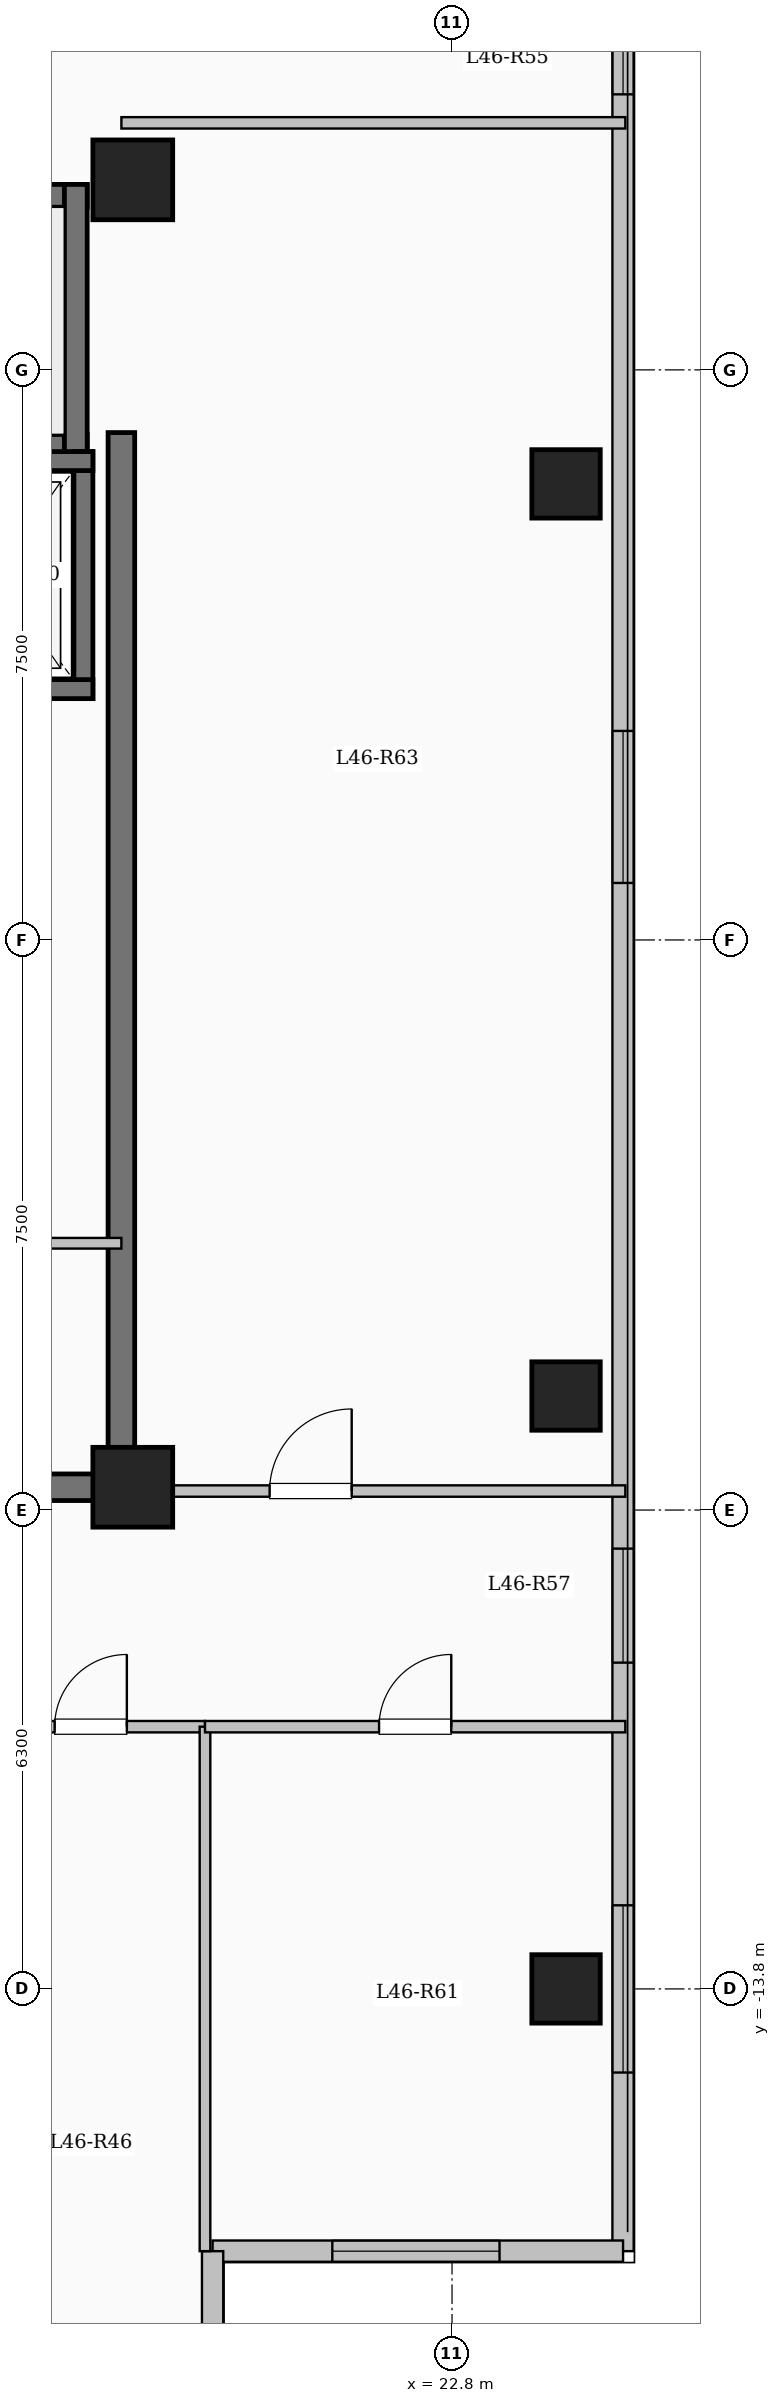
"""IFC4 building model, lengths in metres.
Left out: names, types, materials, properties, quantities, classifications, styles, units other than length and angle.
Written with IfcOpenShell. Run it as: python <this file> out.ifc"""

import sys

from ifc_helpers import new_model, si_unit, direction, frame, frame_2d, origin, origin_2d, place, context, subcontext, project, spatial, rectangle, extrude, element, fill, save


model = new_model("IFC4")
c1 = context("Model", 3, precision=1e-05, world=origin(), true_north=direction((0.0, 1.0)))
c2 = subcontext(c1, "Body", "Model", "MODEL_VIEW")
j1 = project(units=[si_unit("LENGTHUNIT", "METRE"), si_unit("PLANEANGLEUNIT", "RADIAN")], contexts=[c1])
p1 = place(None, origin())
s1 = spatial("IfcSite", under=j1, at=p1, CompositionType="ELEMENT")
p2 = place(p1, origin())
s2 = spatial("IfcBuilding", under=s1, at=p2, CompositionType="ELEMENT")
p3 = place(p2, frame((0.0, 0.0, 169.45)))
s3 = spatial("IfcBuildingStorey", under=s2, at=p3, CompositionType="ELEMENT", Elevation=169.45)
for number, where, z_axis, x_axis in (
    (1, (18.6, -7.2, 0.0), (0.0, 0.0, 1.0), (1.0, 0.0, 0.0)),
    (2, (18.6, 10.0, 0.0), (0.0, 0.0, 1.0), (1.0, 0.0, 0.0)),
):
    element("IfcColumn", number, at=place(p3, frame(where, z_axis=z_axis, x_axis=x_axis)), inside=s3, PredefinedType="COLUMN", context=c2, shape_type="SweptSolid", body=[
        extrude(rectangle(XDim=1.05, YDim=1.05, at=origin_2d()), origin(), (0.0, 0.0, 1.0), 3.35),
    ])
for number, where, z_axis, x_axis in (
    (3, (24.3, -13.8, 0.0), (0.0, 0.0, 1.0), (1.0, 0.0, 0.0)),
    (4, (24.3, -6.0, 0.0), (0.0, 0.0, 1.0), (1.0, 0.0, 0.0)),
    (5, (24.3, 6.0, 0.0), (0.0, 0.0, 1.0), (1.0, 0.0, 0.0)),
):
    element("IfcColumn", number, at=place(p3, frame(where, z_axis=z_axis, x_axis=x_axis)), inside=s3, PredefinedType="COLUMN", context=c2, shape_type="SweptSolid", body=[
        extrude(rectangle(XDim=0.9, YDim=0.9, at=origin_2d()), origin(), (0.0, 0.0, 1.0), 3.35),
    ])
p4 = place(p3, frame((25.05, 17.25, 0.0), z_axis=(0.0, 0.0, 1.0), x_axis=(0.0, -1.0, 0.0)))
e6 = element("IfcWall", 6, at=p4, inside=s3, PredefinedType="SOLIDWALL", context=c2, shape_type="SweptSolid", body=[
    extrude(rectangle(XDim=34.5, YDim=0.28, at=frame_2d((17.25, 0.0))), origin(), (0.0, 0.0, 1.0), 3.05),
])
p5 = place(p4, frame((1.375, 0.0, 0.9)))
e7 = element("IfcOpeningElement", 7, at=p5, cuts=e6, PredefinedType="OPENING", context=c2, shape_type="SweptSolid", body=[
    extrude(rectangle(XDim=2.0, YDim=1.7, at=frame_2d((1.0, 0.85))), frame((0.0, 0.15, 0.0), z_axis=(0.0, -1.0, 0.0), x_axis=(1.0, 0.0, 0.0)), (0.0, 0.0, 1.0), 0.3),
])
p6 = place(p4, frame((5.125, 0.0, 0.95)))
e8 = element("IfcOpeningElement", 8, at=p6, cuts=e6, PredefinedType="OPENING", context=c2, shape_type="SweptSolid", body=[
    extrude(rectangle(XDim=1.0, YDim=1.5, at=frame_2d((0.5, 0.75))), frame((0.0, 0.15, 0.0), z_axis=(0.0, -1.0, 0.0), x_axis=(1.0, 0.0, 0.0)), (0.0, 0.0, 1.0), 0.3),
])
p7 = place(p4, frame((14.5, 0.0, 0.9)))
e9 = element("IfcOpeningElement", 9, at=p7, cuts=e6, PredefinedType="OPENING", context=c2, shape_type="SweptSolid", body=[
    extrude(rectangle(XDim=2.0, YDim=1.7, at=frame_2d((1.0, 0.85))), frame((0.0, 0.15, 0.0), z_axis=(0.0, -1.0, 0.0), x_axis=(1.0, 0.0, 0.0)), (0.0, 0.0, 1.0), 0.3),
])
p8 = place(p4, frame((25.258, 0.0, 0.9)))
e10 = element("IfcOpeningElement", 10, at=p8, cuts=e6, PredefinedType="OPENING", context=c2, shape_type="SweptSolid", body=[
    extrude(rectangle(XDim=1.5, YDim=1.65, at=frame_2d((0.75, 0.825))), frame((0.0, 0.15, 0.0), z_axis=(0.0, -1.0, 0.0), x_axis=(1.0, 0.0, 0.0)), (0.0, 0.0, 1.0), 0.3),
])
p9 = place(p4, frame((29.95, 0.0, 0.9)))
e11 = element("IfcOpeningElement", 11, at=p9, cuts=e6, PredefinedType="OPENING", context=c2, shape_type="SweptSolid", body=[
    extrude(rectangle(XDim=2.2, YDim=1.75, at=frame_2d((1.1, 0.875))), frame((0.0, 0.15, 0.0), z_axis=(0.0, -1.0, 0.0), x_axis=(1.0, 0.0, 0.0)), (0.0, 0.0, 1.0), 0.3),
])
p10 = place(p3, frame((25.05, -17.25, 0.0), z_axis=(0.0, 0.0, 1.0), x_axis=(-1.0, 0.0, 0.0)))
e12 = element("IfcWall", 12, at=p10, inside=s3, PredefinedType="SOLIDWALL", context=c2, shape_type="SweptSolid", body=[
    extrude(rectangle(XDim=5.4, YDim=0.28, at=frame_2d((2.7, 0.0))), origin(), (0.0, 0.0, 1.0), 3.05),
])
p11 = place(p10, frame((1.625, 0.0, 0.9)))
e13 = element("IfcOpeningElement", 13, at=p11, cuts=e12, PredefinedType="OPENING", context=c2, shape_type="SweptSolid", body=[
    extrude(rectangle(XDim=2.2, YDim=1.75, at=frame_2d((1.1, 0.875))), frame((0.0, 0.15, 0.0), z_axis=(0.0, -1.0, 0.0), x_axis=(1.0, 0.0, 0.0)), (0.0, 0.0, 1.0), 0.3),
])
p12 = place(p3, frame((19.65, -17.25, 0.0), z_axis=(0.0, 0.0, 1.0), x_axis=(0.0, -1.0, 0.0)))
e14 = element("IfcWall", 14, at=p12, inside=s3, PredefinedType="SOLIDWALL", context=c2, shape_type="SweptSolid", body=[
    extrude(rectangle(XDim=3.9, YDim=0.28, at=frame_2d((1.95, 0.0))), origin(), (0.0, 0.0, 1.0), 3.05),
])
p13 = place(p12, frame((1.35, 0.0, 0.95)))
e15 = element("IfcOpeningElement", 15, at=p13, cuts=e14, PredefinedType="OPENING", context=c2, shape_type="SweptSolid", body=[
    extrude(rectangle(XDim=1.2, YDim=1.5, at=frame_2d((0.6, 0.75))), frame((0.0, 0.15, 0.0), z_axis=(0.0, -1.0, 0.0), x_axis=(1.0, 0.0, 0.0)), (0.0, 0.0, 1.0), 0.3),
])
p14 = place(p3, frame((10.0, 9.79, 0.0), z_axis=(0.0, 0.0, 1.0), x_axis=(1.0, 0.0, 0.0)))
e16 = element("IfcWall", 16, at=p14, inside=s3, PredefinedType="SHEAR", context=c2, shape_type="SweptSolid", body=[
    extrude(rectangle(XDim=8.0, YDim=0.3, at=frame_2d((4.0, 0.0))), origin(), (0.0, 0.0, 1.0), 3.35),
])
p15 = place(p3, frame((10.0, 6.5, 0.0), z_axis=(0.0, 0.0, 1.0), x_axis=(1.0, 0.0, 0.0)))
e17 = element("IfcWall", 17, at=p15, inside=s3, PredefinedType="SHEAR", context=c2, shape_type="SweptSolid", body=[
    extrude(rectangle(XDim=8.0, YDim=0.3, at=frame_2d((4.0, 0.0))), origin(), (0.0, 0.0, 1.0), 3.35),
])
p16 = place(p15, frame((0.55, 0.0, 0.0)))
e18 = element("IfcOpeningElement", 18, at=p16, cuts=e17, PredefinedType="OPENING", context=c2, shape_type="SweptSolid", body=[
    extrude(rectangle(XDim=1.0, YDim=2.15, at=frame_2d((0.5, 1.075))), frame((0.0, 0.16, 0.0), z_axis=(0.0, -1.0, 0.0), x_axis=(1.0, 0.0, 0.0)), (0.0, 0.0, 1.0), 0.32),
])
p17 = place(p3, frame((17.85, 6.35, 0.0), z_axis=(0.0, 0.0, 1.0), x_axis=(0.0, 1.0, 0.0)))
e19 = element("IfcWall", 19, at=p17, inside=s3, PredefinedType="SHEAR", context=c2, shape_type="SweptSolid", body=[
    extrude(rectangle(XDim=3.59, YDim=0.3, at=frame_2d((1.795, 0.0))), origin(), (0.0, 0.0, 1.0), 3.35),
])
p18 = place(p3, frame((17.95, 3.175, 0.0), z_axis=(0.0, 0.0, 1.0), x_axis=(0.0, 1.0, 0.0)))
e20 = element("IfcWall", 20, at=p18, inside=s3, PredefinedType="SHEAR", context=c2, shape_type="SweptSolid", body=[
    extrude(rectangle(XDim=3.25, YDim=0.25, at=frame_2d((1.625, 0.0))), origin(), (0.0, 0.0, 1.0), 3.35),
])
for number, where, z_axis, x_axis in (
    (21, (15.525, 3.3, 0.0), (0.0, 0.0, 1.0), (1.0, 0.0, 0.0)),
    (22, (15.525, 6.3, 0.0), (0.0, 0.0, 1.0), (1.0, 0.0, 0.0)),
):
    element("IfcWall", number, at=place(p3, frame(where, z_axis=z_axis, x_axis=x_axis)), inside=s3, PredefinedType="SHEAR", context=c2, shape_type="SweptSolid", body=[
        extrude(rectangle(XDim=2.55, YDim=0.25, at=frame_2d((1.275, 0.0))), origin(), (0.0, 0.0, 1.0), 3.35),
    ])
p19 = place(p3, frame((18.45, -7.375, 0.0), z_axis=(0.0, 0.0, 1.0), x_axis=(0.0, 1.0, 0.0)))
e23 = element("IfcWall", 23, at=p19, inside=s3, PredefinedType="SHEAR", context=c2, shape_type="SweptSolid", body=[
    extrude(rectangle(XDim=14.05, YDim=0.35, at=frame_2d((7.025, 0.0))), origin(), (0.0, 0.0, 1.0), 3.35),
])
p20 = place(p3, frame((10.075, -7.2, 0.0), z_axis=(0.0, 0.0, 1.0), x_axis=(1.0, 0.0, 0.0)))
e24 = element("IfcWall", 24, at=p20, inside=s3, PredefinedType="SHEAR", context=c2, shape_type="SweptSolid", body=[
    extrude(rectangle(XDim=8.55, YDim=0.35, at=frame_2d((4.275, 0.0))), origin(), (0.0, 0.0, 1.0), 3.35),
])
p21 = place(p3, frame((15.4, -3.99, 0.0), z_axis=(0.0, 0.0, 1.0), x_axis=(1.0, 0.0, 0.0)))
e25 = element("IfcWall", 25, at=p21, inside=s3, PredefinedType="PARTITIONING", context=c2, shape_type="SweptSolid", body=[
    extrude(rectangle(XDim=3.05, YDim=0.14, at=frame_2d((1.525, 0.0))), origin(), (0.0, 0.0, 1.0), 3.05),
])
p22 = place(p21, frame((1.05, 0.0, 0.0)))
e26 = element("IfcOpeningElement", 26, at=p22, cuts=e25, PredefinedType="OPENING", context=c2, shape_type="SweptSolid", body=[
    extrude(rectangle(XDim=0.9, YDim=2.08, at=frame_2d((0.45, 1.04))), frame((0.0, 0.08, 0.0), z_axis=(0.0, -1.0, 0.0), x_axis=(1.0, 0.0, 0.0)), (0.0, 0.0, 1.0), 0.16),
])
p23 = place(p3, frame((8.55, -10.35, 0.0), z_axis=(0.0, 0.0, 1.0), x_axis=(1.0, 0.0, 0.0)))
e27 = element("IfcWall", 27, at=p23, inside=s3, PredefinedType="PARTITIONING", context=c2, shape_type="SweptSolid", body=[
    extrude(rectangle(XDim=11.0, YDim=0.15, at=frame_2d((5.5, 0.0))), origin(), (0.0, 0.0, 1.0), 3.05),
])
p24 = place(p23, frame((1.516, 0.0, 0.0)))
e28 = element("IfcOpeningElement", 28, at=p24, cuts=e27, PredefinedType="OPENING", context=c2, shape_type="SweptSolid", body=[
    extrude(rectangle(XDim=0.95, YDim=2.15, at=frame_2d((0.475, 1.075))), frame((0.0, 0.085, 0.0), z_axis=(0.0, -1.0, 0.0), x_axis=(1.0, 0.0, 0.0)), (0.0, 0.0, 1.0), 0.17),
])
p25 = place(p23, frame((5.488, 0.0, 0.0)))
e29 = element("IfcOpeningElement", 29, at=p25, cuts=e27, PredefinedType="OPENING", context=c2, shape_type="SweptSolid", body=[
    extrude(rectangle(XDim=0.95, YDim=2.15, at=frame_2d((0.475, 1.075))), frame((0.0, 0.085, 0.0), z_axis=(0.0, -1.0, 0.0), x_axis=(1.0, 0.0, 0.0)), (0.0, 0.0, 1.0), 0.17),
])
p26 = place(p23, frame((9.022, 0.0, 0.0)))
e30 = element("IfcOpeningElement", 30, at=p26, cuts=e27, PredefinedType="OPENING", context=c2, shape_type="SweptSolid", body=[
    extrude(rectangle(XDim=0.95, YDim=2.15, at=frame_2d((0.475, 1.075))), frame((0.0, 0.085, 0.0), z_axis=(0.0, -1.0, 0.0), x_axis=(1.0, 0.0, 0.0)), (0.0, 0.0, 1.0), 0.17),
])
p27 = place(p3, frame((18.45, -7.25, 0.0), z_axis=(0.0, 0.0, 1.0), x_axis=(1.0, 0.0, 0.0)))
e31 = element("IfcWall", 31, at=p27, inside=s3, PredefinedType="PARTITIONING", context=c2, shape_type="SweptSolid", body=[
    extrude(rectangle(XDim=6.63, YDim=0.15, at=frame_2d((3.315, 0.0))), origin(), (0.0, 0.0, 1.0), 3.05),
])
p28 = place(p27, frame((1.95, 0.0, 0.0)))
e32 = element("IfcOpeningElement", 32, at=p28, cuts=e31, PredefinedType="OPENING", context=c2, shape_type="SweptSolid", body=[
    extrude(rectangle(XDim=1.08, YDim=2.15, at=frame_2d((0.54, 1.075))), frame((0.0, 0.085, 0.0), z_axis=(0.0, -1.0, 0.0), x_axis=(1.0, 0.0, 0.0)), (0.0, 0.0, 1.0), 0.17),
])
p29 = place(p3, frame((18.45, 10.75, 0.0), z_axis=(0.0, 0.0, 1.0), x_axis=(1.0, 0.0, 0.0)))
e33 = element("IfcWall", 33, at=p29, inside=s3, PredefinedType="PARTITIONING", context=c2, shape_type="SweptSolid", body=[
    extrude(rectangle(XDim=6.63, YDim=0.15, at=frame_2d((3.315, 0.0))), origin(), (0.0, 0.0, 1.0), 3.05),
])
p30 = place(p3, frame((19.55, -17.25, 0.0), z_axis=(0.0, 0.0, 1.0), x_axis=(0.0, 1.0, 0.0)))
e34 = element("IfcWall", 34, at=p30, inside=s3, PredefinedType="PARTITIONING", context=c2, shape_type="SweptSolid", body=[
    extrude(rectangle(XDim=6.9, YDim=0.14, at=frame_2d((3.45, 0.0))), origin(), (0.0, 0.0, 1.0), 3.05),
])
p31 = place(p3, frame((19.55, -10.35, 0.0), z_axis=(0.0, 0.0, 1.0), x_axis=(1.0, 0.0, 0.0)))
e35 = element("IfcWall", 35, at=p31, inside=s3, PredefinedType="PARTITIONING", context=c2, shape_type="SweptSolid", body=[
    extrude(rectangle(XDim=5.53, YDim=0.15, at=frame_2d((2.765, 0.0))), origin(), (0.0, 0.0, 1.0), 3.05),
])
p32 = place(p31, frame((2.29, 0.0, 0.0)))
e36 = element("IfcOpeningElement", 36, at=p32, cuts=e35, PredefinedType="OPENING", context=c2, shape_type="SweptSolid", body=[
    extrude(rectangle(XDim=0.95, YDim=2.15, at=frame_2d((0.475, 1.075))), frame((0.0, 0.085, 0.0), z_axis=(0.0, -1.0, 0.0), x_axis=(1.0, 0.0, 0.0)), (0.0, 0.0, 1.0), 0.17),
])
p33 = place(p6, origin())
e37 = element("IfcWindow", 37, at=p33, inside=s3, PartitioningType="SINGLE_PANEL", PredefinedType="WINDOW", context=c2, shape_type="SweptSolid", body=[
    extrude(rectangle(XDim=1.0, YDim=1.5, at=frame_2d((0.5, 0.75))), frame((0.0, 0.03, 0.0), z_axis=(0.0, -1.0, 0.0), x_axis=(1.0, 0.0, 0.0)), (0.0, 0.0, 1.0), 0.06),
])
fill(e8, e37)
p34 = place(p7, origin())
e38 = element("IfcWindow", 38, at=p34, inside=s3, PartitioningType="SINGLE_PANEL", PredefinedType="WINDOW", context=c2, shape_type="SweptSolid", body=[
    extrude(rectangle(XDim=2.0, YDim=1.7, at=frame_2d((1.0, 0.85))), frame((0.0, 0.03, 0.0), z_axis=(0.0, -1.0, 0.0), x_axis=(1.0, 0.0, 0.0)), (0.0, 0.0, 1.0), 0.06),
])
fill(e9, e38)
p35 = place(p8, origin())
e39 = element("IfcWindow", 39, at=p35, inside=s3, PartitioningType="SINGLE_PANEL", PredefinedType="WINDOW", context=c2, shape_type="SweptSolid", body=[
    extrude(rectangle(XDim=1.5, YDim=1.65, at=frame_2d((0.75, 0.825))), frame((0.0, 0.03, 0.0), z_axis=(0.0, -1.0, 0.0), x_axis=(1.0, 0.0, 0.0)), (0.0, 0.0, 1.0), 0.06),
])
fill(e10, e39)
p36 = place(p9, origin())
e40 = element("IfcWindow", 40, at=p36, inside=s3, PartitioningType="SINGLE_PANEL", PredefinedType="WINDOW", context=c2, shape_type="SweptSolid", body=[
    extrude(rectangle(XDim=2.2, YDim=1.75, at=frame_2d((1.1, 0.875))), frame((0.0, 0.03, 0.0), z_axis=(0.0, -1.0, 0.0), x_axis=(1.0, 0.0, 0.0)), (0.0, 0.0, 1.0), 0.06),
])
fill(e11, e40)
p37 = place(p11, origin())
e41 = element("IfcWindow", 41, at=p37, inside=s3, PartitioningType="SINGLE_PANEL", PredefinedType="WINDOW", context=c2, shape_type="SweptSolid", body=[
    extrude(rectangle(XDim=2.2, YDim=1.75, at=frame_2d((1.1, 0.875))), frame((0.0, 0.03, 0.0), z_axis=(0.0, -1.0, 0.0), x_axis=(1.0, 0.0, 0.0)), (0.0, 0.0, 1.0), 0.06),
])
fill(e13, e41)
p38 = place(p26, origin())
e42 = element("IfcDoor", 42, at=p38, inside=s3, OperationType="SINGLE_SWING_RIGHT", PredefinedType="DOOR", context=c2, shape_type="SweptSolid", body=[
    extrude(rectangle(XDim=0.95, YDim=2.15, at=frame_2d((0.475, 1.075))), frame((0.0, 0.025, 0.0), z_axis=(0.0, -1.0, 0.0), x_axis=(1.0, 0.0, 0.0)), (0.0, 0.0, 1.0), 0.05),
])
fill(e30, e42)
p39 = place(p32, origin())
e43 = element("IfcDoor", 43, at=p39, inside=s3, OperationType="SINGLE_SWING_RIGHT", PredefinedType="DOOR", context=c2, shape_type="SweptSolid", body=[
    extrude(rectangle(XDim=0.95, YDim=2.15, at=frame_2d((0.475, 1.075))), frame((0.0, 0.025, 0.0), z_axis=(0.0, -1.0, 0.0), x_axis=(1.0, 0.0, 0.0)), (0.0, 0.0, 1.0), 0.05),
])
fill(e36, e43)
p40 = place(p28, origin())
e44 = element("IfcDoor", 44, at=p40, inside=s3, OperationType="SINGLE_SWING_RIGHT", PredefinedType="DOOR", context=c2, shape_type="SweptSolid", body=[
    extrude(rectangle(XDim=1.08, YDim=2.15, at=frame_2d((0.54, 1.075))), frame((0.0, 0.025, 0.0), z_axis=(0.0, -1.0, 0.0), x_axis=(1.0, 0.0, 0.0)), (0.0, 0.0, 1.0), 0.05),
])
fill(e32, e44)
save(model, sys.argv[1])
